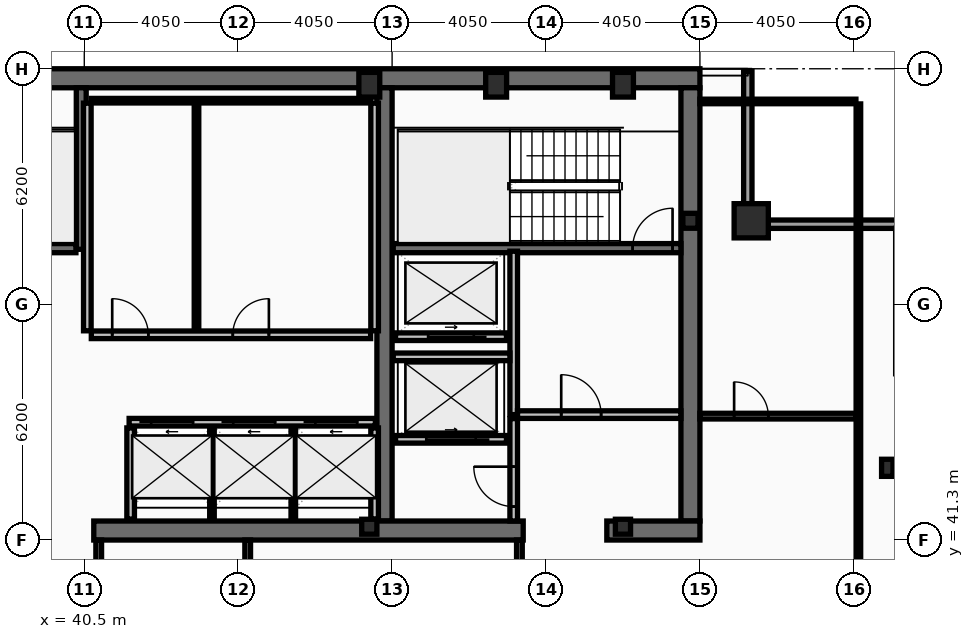
"""IFC4 building model, lengths in metres.
Left out: names, types, materials, properties, quantities, classifications, styles, units other than length and angle.
Written with IfcOpenShell. Run it as: python <this file> out.ifc"""

import sys

from ifc_helpers import new_model, si_unit, direction, frame, frame_2d, origin, origin_2d, place, context, subcontext, project, spatial, rectangle, hollow_rectangle, i_section, extrude, element, fill, save


model = new_model("IFC4")
c1 = context("Model", 3, precision=1e-05, world=origin(), true_north=direction((0.0, 1.0)))
c2 = subcontext(c1, "Body", "Model", "MODEL_VIEW")
j1 = project(units=[si_unit("LENGTHUNIT", "METRE"), si_unit("PLANEANGLEUNIT", "RADIAN")], contexts=[c1])
p1 = place(None, origin())
s1 = spatial("IfcSite", under=j1, at=p1, CompositionType="ELEMENT")
p2 = place(p1, origin())
s2 = spatial("IfcBuilding", under=s1, at=p2, CompositionType="ELEMENT")
p3 = place(p2, frame((0.0, 0.0, 339.8)))
s3 = spatial("IfcBuildingStorey", under=s2, at=p3, CompositionType="ELEMENT", Elevation=339.8)
p4 = place(p3, frame((16.2, 53.45, 0.0), z_axis=(0.0, 0.0, 1.0), x_axis=(1.0, 0.0, 0.0)))
e1 = element("IfcWall", 1, at=p4, inside=s3, PredefinedType="SHEAR", context=c2, shape_type="SweptSolid", body=[
    extrude(rectangle(XDim=40.5, YDim=0.5, at=frame_2d((20.25, 0.0))), origin(), (0.0, 0.0, 1.0), 3.44),
])
p5 = place(p3, frame((56.45, 53.2, 0.0), z_axis=(0.0, 0.0, 1.0), x_axis=(0.0, -1.0, 0.0)))
e2 = element("IfcWall", 2, at=p5, inside=s3, PredefinedType="SHEAR", context=c2, shape_type="SweptSolid", body=[
    extrude(rectangle(XDim=11.4, YDim=0.5, at=frame_2d((5.7, 0.0))), origin(), (0.0, 0.0, 1.0), 3.44),
])
p6 = place(p3, frame((48.4, 41.8, 0.0), z_axis=(0.0, 0.0, 1.0), x_axis=(0.0, 1.0, 0.0)))
e3 = element("IfcWall", 3, at=p6, inside=s3, PredefinedType="SHEAR", context=c2, shape_type="SweptSolid", body=[
    extrude(rectangle(XDim=11.4, YDim=0.4, at=frame_2d((5.7, 0.0))), origin(), (0.0, 0.0, 1.0), 3.44),
])
p7 = place(p3, frame((52.05, 41.55, 0.0), z_axis=(0.0, 0.0, 1.0), x_axis=(-1.0, 0.0, 0.0)))
e4 = element("IfcWall", 4, at=p7, inside=s3, PredefinedType="SHEAR", context=c2, shape_type="SweptSolid", body=[
    extrude(rectangle(XDim=11.3, YDim=0.5, at=frame_2d((5.65, 0.0))), origin(), (0.0, 0.0, 1.0), 3.44),
])
p8 = place(p3, frame((56.7, 41.55, 0.0), z_axis=(0.0, 0.0, 1.0), x_axis=(-1.0, 0.0, 0.0)))
e5 = element("IfcWall", 5, at=p8, inside=s3, PredefinedType="SHEAR", context=c2, shape_type="SweptSolid", body=[
    extrude(rectangle(XDim=2.45, YDim=0.5, at=frame_2d((1.225, 0.0))), origin(), (0.0, 0.0, 1.0), 3.44),
])
p9 = place(p3, frame((40.42, 48.95, 0.0), z_axis=(0.0, 0.0, 1.0), x_axis=(0.0, 1.0, 0.0)))
e6 = element("IfcWall", 6, at=p9, inside=s3, PredefinedType="SHEAR", context=c2, shape_type="SweptSolid", body=[
    extrude(rectangle(XDim=4.25, YDim=0.26, at=frame_2d((2.125, 0.0))), origin(), (0.0, 0.0, 1.0), 3.44),
])
p10 = place(p3, frame((48.63, 48.98, 0.0), z_axis=(0.0, 0.0, 1.0), x_axis=(1.0, 0.0, 0.0)))
e7 = element("IfcWall", 7, at=p10, inside=s3, PredefinedType="SHEAR", context=c2, shape_type="SweptSolid", body=[
    extrude(rectangle(XDim=7.57, YDim=0.24, at=frame_2d((3.785, 0.0))), origin(), (0.0, 0.0, 1.0), 3.44),
])
p11 = place(p10, frame((6.3, 0.0, 0.0)))
e8 = element("IfcOpeningElement", 8, at=p11, cuts=e7, PredefinedType="OPENING", context=c2, shape_type="SweptSolid", body=[
    extrude(rectangle(XDim=1.05, YDim=2.15, at=frame_2d((0.525, 1.075))), frame((0.0, 0.13, 0.0), z_axis=(0.0, -1.0, 0.0), x_axis=(1.0, 0.0, 0.0)), (0.0, 0.0, 1.0), 0.26),
])
p12 = place(p3, frame((32.72, 48.98, 0.0), z_axis=(0.0, 0.0, 1.0), x_axis=(1.0, 0.0, 0.0)))
e9 = element("IfcWall", 9, at=p12, inside=s3, PredefinedType="SHEAR", context=c2, shape_type="SweptSolid", body=[
    extrude(rectangle(XDim=7.56, YDim=0.24, at=frame_2d((3.78, 0.0))), origin(), (0.0, 0.0, 1.0), 3.44),
])
p13 = place(p12, frame((0.22, 0.0, 0.0)))
e10 = element("IfcOpeningElement", 10, at=p13, cuts=e9, PredefinedType="OPENING", context=c2, shape_type="SweptSolid", body=[
    extrude(rectangle(XDim=1.05, YDim=2.15, at=frame_2d((0.525, 1.075))), frame((0.0, 0.13, 0.0), z_axis=(0.0, -1.0, 0.0), x_axis=(1.0, 0.0, 0.0)), (0.0, 0.0, 1.0), 0.26),
])
p14 = place(p3, frame((58.05, 49.7, 0.0), z_axis=(0.0, 0.0, 1.0), x_axis=(1.0, 0.0, 0.0)))
e11 = element("IfcColumn", 11, at=p14, inside=s3, PredefinedType="COLUMN", context=c2, shape_type="SweptSolid", body=[
    extrude(hollow_rectangle(XDim=0.9, YDim=0.9, WallThickness=0.05, at=origin_2d()), origin(), (0.0, 0.0, 1.0), 3.6),
])
for number, where, z_axis, x_axis in (
    (12, (48.0, 53.28, 0.0), (0.0, 0.0, 1.0), (1.0, 0.0, 0.0)),
    (13, (51.337, 53.28, 0.0), (0.0, 0.0, 1.0), (1.0, 0.0, 0.0)),
    (14, (54.675, 53.28, 0.0), (0.0, 0.0, 1.0), (1.0, 0.0, 0.0)),
):
    element("IfcColumn", number, at=place(p3, frame(where, z_axis=z_axis, x_axis=x_axis)), inside=s3, PredefinedType="COLUMN", context=c2, shape_type="SweptSolid", body=[
        extrude(hollow_rectangle(XDim=0.55, YDim=0.65, WallThickness=0.04, at=origin_2d()), origin(), (0.0, 0.0, 1.0), 3.6),
    ])
p15 = place(p3, frame((61.63, 43.2, 0.0), z_axis=(0.0, 0.0, 1.0), x_axis=(1.0, 0.0, 0.0)))
e15 = element("IfcColumn", 15, at=p15, inside=s3, PredefinedType="COLUMN", context=c2, shape_type="SweptSolid", body=[
    extrude(i_section(OverallWidth=0.3, OverallDepth=0.45, WebThickness=0.014, FlangeThickness=0.026, at=origin_2d()), origin(), (0.0, 0.0, 1.0), 3.6),
])
for number, where, z_axis, x_axis in (
    (16, (56.45, 49.7, 0.0), (0.0, 0.0, 1.0), (1.0, 0.0, 0.0)),
    (17, (48.0, 41.65, 0.0), (0.0, 0.0, 1.0), (1.0, 0.0, 0.0)),
    (18, (54.675, 41.65, 0.0), (0.0, 0.0, 1.0), (1.0, 0.0, 0.0)),
):
    element("IfcColumn", number, at=place(p3, frame(where, z_axis=z_axis, x_axis=x_axis)), inside=s3, PredefinedType="COLUMN", context=c2, shape_type="SweptSolid", body=[
        extrude(i_section(OverallWidth=0.399, OverallDepth=0.393, WebThickness=0.023, FlangeThickness=0.037, at=origin_2d()), origin(), (0.0, 0.0, 1.0), 3.6),
    ])
p16 = place(p3, frame((57.96, 53.63, 0.0), z_axis=(0.0, 0.0, 1.0), x_axis=(0.0, -1.0, 0.0)))
e19 = element("IfcWall", 19, at=p16, inside=s3, PredefinedType="SOLIDWALL", context=c2, shape_type="SweptSolid", body=[
    extrude(rectangle(XDim=3.91, YDim=0.22, at=frame_2d((1.955, 0.0))), origin(), (0.0, 0.0, 1.0), 2.88),
])
p17 = place(p3, frame((57.85, 49.61, 0.0), z_axis=(0.0, 0.0, 1.0), x_axis=(1.0, 0.0, 0.0)))
e20 = element("IfcWall", 20, at=p17, inside=s3, PredefinedType="SOLIDWALL", context=c2, shape_type="SweptSolid", body=[
    extrude(rectangle(XDim=4.22, YDim=0.22, at=frame_2d((2.11, 0.0))), origin(), (0.0, 0.0, 1.0), 2.88),
])
p18 = place(p3, frame((41.68, 44.4, 0.0), z_axis=(0.0, 0.0, 1.0), x_axis=(1.0, 0.0, 0.0)))
e21 = element("IfcWall", 21, at=p18, inside=s3, PredefinedType="PARTITIONING", context=c2, shape_type="SweptSolid", body=[
    extrude(rectangle(XDim=6.48, YDim=0.2, at=frame_2d((3.24, 0.0))), origin(), (0.0, 0.0, 1.0), 3.44),
])
p19 = place(p18, frame((0.58, 0.0, 0.0)))
e22 = element("IfcOpeningElement", 22, at=p19, cuts=e21, PredefinedType="OPENING", context=c2, shape_type="SweptSolid", body=[
    extrude(rectangle(XDim=1.1, YDim=2.18, at=frame_2d((0.55, 1.09))), frame((0.0, 0.11, 0.0), z_axis=(0.0, -1.0, 0.0), x_axis=(1.0, 0.0, 0.0)), (0.0, 0.0, 1.0), 0.22),
])
p20 = place(p18, frame((2.74, 0.0, 0.0)))
e23 = element("IfcOpeningElement", 23, at=p20, cuts=e21, PredefinedType="OPENING", context=c2, shape_type="SweptSolid", body=[
    extrude(rectangle(XDim=1.1, YDim=2.18, at=frame_2d((0.55, 1.09))), frame((0.0, 0.11, 0.0), z_axis=(0.0, -1.0, 0.0), x_axis=(1.0, 0.0, 0.0)), (0.0, 0.0, 1.0), 0.22),
])
p21 = place(p18, frame((4.9, 0.0, 0.0)))
e24 = element("IfcOpeningElement", 24, at=p21, cuts=e21, PredefinedType="OPENING", context=c2, shape_type="SweptSolid", body=[
    extrude(rectangle(XDim=1.1, YDim=2.18, at=frame_2d((0.55, 1.09))), frame((0.0, 0.11, 0.0), z_axis=(0.0, -1.0, 0.0), x_axis=(1.0, 0.0, 0.0)), (0.0, 0.0, 1.0), 0.22),
])
p22 = place(p3, frame((51.61, 43.95, 0.0), z_axis=(0.0, 0.0, 1.0), x_axis=(-1.0, 0.0, 0.0)))
e25 = element("IfcWall", 25, at=p22, inside=s3, PredefinedType="PARTITIONING", context=c2, shape_type="SweptSolid", body=[
    extrude(rectangle(XDim=2.92, YDim=0.2, at=frame_2d((1.46, 0.0))), origin(), (0.0, 0.0, 1.0), 3.44),
])
p23 = place(p22, frame((0.81, 0.0, 0.0)))
e26 = element("IfcOpeningElement", 26, at=p23, cuts=e25, PredefinedType="OPENING", context=c2, shape_type="SweptSolid", body=[
    extrude(rectangle(XDim=1.3, YDim=2.18, at=frame_2d((0.65, 1.09))), frame((0.0, 0.11, 0.0), z_axis=(0.0, -1.0, 0.0), x_axis=(1.0, 0.0, 0.0)), (0.0, 0.0, 1.0), 0.22),
])
p24 = place(p3, frame((51.61, 46.65, 0.0), z_axis=(0.0, 0.0, 1.0), x_axis=(-1.0, 0.0, 0.0)))
e27 = element("IfcWall", 27, at=p24, inside=s3, PredefinedType="PARTITIONING", context=c2, shape_type="SweptSolid", body=[
    extrude(rectangle(XDim=2.92, YDim=0.2, at=frame_2d((1.46, 0.0))), origin(), (0.0, 0.0, 1.0), 3.44),
])
p25 = place(p24, frame((0.86, 0.0, 0.0)))
e28 = element("IfcOpeningElement", 28, at=p25, cuts=e27, PredefinedType="OPENING", context=c2, shape_type="SweptSolid", body=[
    extrude(rectangle(XDim=1.2, YDim=2.18, at=frame_2d((0.6, 1.09))), frame((0.0, 0.11, 0.0), z_axis=(0.0, -1.0, 0.0), x_axis=(1.0, 0.0, 0.0)), (0.0, 0.0, 1.0), 0.22),
])
p26 = place(p3, frame((51.8, 44.6, 0.0), z_axis=(0.0, 0.0, 1.0), x_axis=(0.0, 1.0, 0.0)))
e29 = element("IfcWall", 29, at=p26, inside=s3, PredefinedType="PARTITIONING", context=c2, shape_type="SweptSolid", body=[
    extrude(rectangle(XDim=4.3, YDim=0.2, at=frame_2d((2.15, 0.0))), origin(), (0.0, 0.0, 1.0), 3.44),
])
p27 = place(p3, frame((51.9, 44.6, 0.0), z_axis=(0.0, 0.0, 1.0), x_axis=(1.0, 0.0, 0.0)))
e30 = element("IfcWall", 30, at=p27, inside=s3, PredefinedType="PARTITIONING", context=c2, shape_type="SweptSolid", body=[
    extrude(rectangle(XDim=4.3, YDim=0.2, at=frame_2d((2.15, 0.0))), origin(), (0.0, 0.0, 1.0), 3.44),
])
p28 = place(p27, frame((1.15, 0.0, 0.0)))
e31 = element("IfcOpeningElement", 31, at=p28, cuts=e30, PredefinedType="OPENING", context=c2, shape_type="SweptSolid", body=[
    extrude(rectangle(XDim=1.05, YDim=2.15, at=frame_2d((0.525, 1.075))), frame((0.0, 0.11, 0.0), z_axis=(0.0, -1.0, 0.0), x_axis=(1.0, 0.0, 0.0)), (0.0, 0.0, 1.0), 0.22),
])
p29 = place(p3, frame((48.63, 46.12, 0.0), z_axis=(0.0, 0.0, 1.0), x_axis=(1.0, 0.0, 0.0)))
e32 = element("IfcWall", 32, at=p29, inside=s3, PredefinedType="PARTITIONING", context=c2, shape_type="SweptSolid", body=[
    extrude(rectangle(XDim=3.07, YDim=0.2, at=frame_2d((1.535, 0.0))), origin(), (0.0, 0.0, 1.0), 3.44),
])
p30 = place(p3, frame((51.8, 41.8, 0.0), z_axis=(0.0, 0.0, 1.0), x_axis=(0.0, 1.0, 0.0)))
e33 = element("IfcWall", 33, at=p30, inside=s3, PredefinedType="PARTITIONING", context=c2, shape_type="SweptSolid", body=[
    extrude(rectangle(XDim=2.695, YDim=0.2, at=frame_2d((1.348, 0.0))), origin(), (0.0, 0.0, 1.0), 3.44),
])
p31 = place(p30, frame((0.38, 0.0, 0.0)))
e34 = element("IfcOpeningElement", 34, at=p31, cuts=e33, PredefinedType="OPENING", context=c2, shape_type="SweptSolid", body=[
    extrude(rectangle(XDim=1.05, YDim=2.15, at=frame_2d((0.525, 1.075))), frame((0.0, 0.11, 0.0), z_axis=(0.0, -1.0, 0.0), x_axis=(1.0, 0.0, 0.0)), (0.0, 0.0, 1.0), 0.22),
])
for number, where, z_axis, x_axis in (
    (35, (40.58, 46.805, 0.0), (0.0, 0.0, 1.0), (0.0, 1.0, 0.0)),
    (36, (48.14, 46.805, 0.0), (0.0, 0.0, 1.0), (0.0, 1.0, 0.0)),
):
    element("IfcWall", number, at=place(p3, frame(where, z_axis=z_axis, x_axis=x_axis)), inside=s3, PredefinedType="PARTITIONING", context=c2, shape_type="SweptSolid", body=[
        extrude(rectangle(XDim=5.99, YDim=0.2, at=frame_2d((2.995, 0.0))), origin(), (0.0, 0.0, 1.0), 3.44),
    ])
p32 = place(p3, frame((40.685, 52.86, 0.0), z_axis=(0.0, 0.0, 1.0), x_axis=(1.0, 0.0, 0.0)))
e37 = element("IfcWall", 37, at=p32, inside=s3, PredefinedType="PARTITIONING", context=c2, shape_type="SweptSolid", body=[
    extrude(rectangle(XDim=7.35, YDim=0.12, at=frame_2d((3.675, 0.0))), origin(), (0.0, 0.0, 1.0), 3.44),
])
p33 = place(p3, frame((43.453, 46.805, 0.0), z_axis=(0.0, 0.0, 1.0), x_axis=(0.0, 1.0, 0.0)))
e38 = element("IfcWall", 38, at=p33, inside=s3, PredefinedType="PARTITIONING", context=c2, shape_type="SweptSolid", body=[
    extrude(rectangle(XDim=5.99, YDim=0.12, at=frame_2d((2.995, 0.0))), origin(), (0.0, 0.0, 1.0), 3.44),
])
p34 = place(p3, frame((40.685, 46.7, 0.0), z_axis=(0.0, 0.0, 1.0), x_axis=(1.0, 0.0, 0.0)))
e39 = element("IfcWall", 39, at=p34, inside=s3, PredefinedType="PARTITIONING", context=c2, shape_type="SweptSolid", body=[
    extrude(rectangle(XDim=7.35, YDim=0.2, at=frame_2d((3.675, 0.0))), origin(), (0.0, 0.0, 1.0), 3.44),
])
p35 = place(p34, frame((0.55, 0.0, 0.0)))
e40 = element("IfcOpeningElement", 40, at=p35, cuts=e39, PredefinedType="OPENING", context=c2, shape_type="SweptSolid", body=[
    extrude(rectangle(XDim=0.95, YDim=2.1, at=frame_2d((0.475, 1.05))), frame((0.0, 0.11, 0.0), z_axis=(0.0, -1.0, 0.0), x_axis=(1.0, 0.0, 0.0)), (0.0, 0.0, 1.0), 0.22),
])
p36 = place(p34, frame((3.723, 0.0, 0.0)))
e41 = element("IfcOpeningElement", 41, at=p36, cuts=e39, PredefinedType="OPENING", context=c2, shape_type="SweptSolid", body=[
    extrude(rectangle(XDim=0.95, YDim=2.1, at=frame_2d((0.475, 1.05))), frame((0.0, 0.11, 0.0), z_axis=(0.0, -1.0, 0.0), x_axis=(1.0, 0.0, 0.0)), (0.0, 0.0, 1.0), 0.22),
])
for number, where, z_axis, x_axis in (
    (42, (41.72, 41.85, 0.0), (0.0, 0.0, 1.0), (0.0, 1.0, 0.0)),
    (43, (48.14, 41.85, 0.0), (0.0, 0.0, 1.0), (0.0, 1.0, 0.0)),
):
    element("IfcWall", number, at=place(p3, frame(where, z_axis=z_axis, x_axis=x_axis)), inside=s3, PredefinedType="PARTITIONING", context=c2, shape_type="SweptSolid", body=[
        extrude(rectangle(XDim=2.4, YDim=0.2, at=frame_2d((1.2, 0.0))), origin(), (0.0, 0.0, 1.0), 3.44),
    ])
for number, where, z_axis, x_axis in (
    (44, (43.86, 41.85, 0.0), (0.0, 0.0, 1.0), (0.0, 1.0, 0.0)),
    (45, (46.0, 41.85, 0.0), (0.0, 0.0, 1.0), (0.0, 1.0, 0.0)),
):
    element("IfcWall", number, at=place(p3, frame(where, z_axis=z_axis, x_axis=x_axis)), inside=s3, PredefinedType="PARTITIONING", context=c2, shape_type="SweptSolid", body=[
        extrude(rectangle(XDim=2.4, YDim=0.12, at=frame_2d((1.2, 0.0))), origin(), (0.0, 0.0, 1.0), 3.44),
    ])
for number, where, z_axis, x_axis in (
    (46, (40.88, 38.28, 0.0), (0.0, 0.0, 1.0), (0.0, 1.0, 0.0)),
    (47, (44.8, 38.28, 0.0), (0.0, 0.0, 1.0), (0.0, 1.0, 0.0)),
    (48, (51.95, 38.28, 0.0), (0.0, 0.0, 1.0), (0.0, 1.0, 0.0)),
):
    element("IfcWall", number, at=place(p3, frame(where, z_axis=z_axis, x_axis=x_axis)), inside=s3, PredefinedType="PARTITIONING", context=c2, shape_type="SweptSolid", body=[
        extrude(rectangle(XDim=3.02, YDim=0.15, at=frame_2d((1.51, 0.0))), origin(), (0.0, 0.0, 1.0), 3.44),
    ])
p37 = place(p3, frame((56.7, 44.56, 0.0), z_axis=(0.0, 0.0, 1.0), x_axis=(1.0, 0.0, 0.0)))
e49 = element("IfcWall", 49, at=p37, inside=s3, PredefinedType="PARTITIONING", context=c2, shape_type="SweptSolid", body=[
    extrude(rectangle(XDim=4.105, YDim=0.15, at=frame_2d((2.052, 0.0))), origin(), (0.0, 0.0, 1.0), 2.88),
])
p38 = place(p37, frame((0.9, 0.0, 0.0)))
e50 = element("IfcOpeningElement", 50, at=p38, cuts=e49, PredefinedType="OPENING", context=c2, shape_type="SweptSolid", body=[
    extrude(rectangle(XDim=0.9, YDim=2.05, at=frame_2d((0.45, 1.025))), frame((0.0, 0.085, 0.0), z_axis=(0.0, -1.0, 0.0), x_axis=(1.0, 0.0, 0.0)), (0.0, 0.0, 1.0), 0.17),
])
p39 = place(p3, frame((60.87, 10.665, 0.0), z_axis=(0.0, 0.0, 1.0), x_axis=(0.0, 1.0, 0.0)))
e51 = element("IfcWall", 51, at=p39, inside=s3, PredefinedType="PARTITIONING", context=c2, shape_type="SweptSolid", body=[
    extrude(rectangle(XDim=42.11, YDim=0.12, at=frame_2d((21.055, 0.0))), origin(), (0.0, 0.0, 1.0), 2.83),
])
p40 = place(p3, frame((56.7, 52.84, 0.0), z_axis=(0.0, 0.0, 1.0), x_axis=(1.0, 0.0, 0.0)))
e52 = element("IfcWall", 52, at=p40, inside=s3, PredefinedType="PARTITIONING", context=c2, shape_type="SweptSolid", body=[
    extrude(rectangle(XDim=4.105, YDim=0.12, at=frame_2d((2.052, 0.0))), origin(), (0.0, 0.0, 1.0), 3.44),
])
p41 = place(p11, origin())
e53 = element("IfcDoor", 53, at=p41, inside=s3, OperationType="SINGLE_SWING_RIGHT", PredefinedType="DOOR", context=c2, shape_type="SweptSolid", body=[
    extrude(rectangle(XDim=1.05, YDim=2.15, at=frame_2d((0.525, 1.075))), frame((0.0, 0.025, 0.0), z_axis=(0.0, -1.0, 0.0), x_axis=(1.0, 0.0, 0.0)), (0.0, 0.0, 1.0), 0.05),
])
fill(e8, e53)
p42 = place(p19, origin())
e54 = element("IfcDoor", 54, at=p42, inside=s3, OperationType="SLIDING_TO_LEFT", PredefinedType="DOOR", context=c2, shape_type="SweptSolid", body=[
    extrude(rectangle(XDim=1.1, YDim=2.18, at=frame_2d((0.55, 1.09))), frame((0.0, 0.025, 0.0), z_axis=(0.0, -1.0, 0.0), x_axis=(1.0, 0.0, 0.0)), (0.0, 0.0, 1.0), 0.05),
])
fill(e22, e54)
p43 = place(p20, origin())
e55 = element("IfcDoor", 55, at=p43, inside=s3, OperationType="SLIDING_TO_LEFT", PredefinedType="DOOR", context=c2, shape_type="SweptSolid", body=[
    extrude(rectangle(XDim=1.1, YDim=2.18, at=frame_2d((0.55, 1.09))), frame((0.0, 0.025, 0.0), z_axis=(0.0, -1.0, 0.0), x_axis=(1.0, 0.0, 0.0)), (0.0, 0.0, 1.0), 0.05),
])
fill(e23, e55)
p44 = place(p21, origin())
e56 = element("IfcDoor", 56, at=p44, inside=s3, OperationType="SLIDING_TO_LEFT", PredefinedType="DOOR", context=c2, shape_type="SweptSolid", body=[
    extrude(rectangle(XDim=1.1, YDim=2.18, at=frame_2d((0.55, 1.09))), frame((0.0, 0.025, 0.0), z_axis=(0.0, -1.0, 0.0), x_axis=(1.0, 0.0, 0.0)), (0.0, 0.0, 1.0), 0.05),
])
fill(e24, e56)
p45 = place(p23, origin())
e57 = element("IfcDoor", 57, at=p45, inside=s3, OperationType="SLIDING_TO_LEFT", PredefinedType="DOOR", context=c2, shape_type="SweptSolid", body=[
    extrude(rectangle(XDim=1.3, YDim=2.18, at=frame_2d((0.65, 1.09))), frame((0.0, 0.025, 0.0), z_axis=(0.0, -1.0, 0.0), x_axis=(1.0, 0.0, 0.0)), (0.0, 0.0, 1.0), 0.05),
])
fill(e26, e57)
p46 = place(p25, origin())
e58 = element("IfcDoor", 58, at=p46, inside=s3, OperationType="SLIDING_TO_LEFT", PredefinedType="DOOR", context=c2, shape_type="SweptSolid", body=[
    extrude(rectangle(XDim=1.2, YDim=2.18, at=frame_2d((0.6, 1.09))), frame((0.0, 0.025, 0.0), z_axis=(0.0, -1.0, 0.0), x_axis=(1.0, 0.0, 0.0)), (0.0, 0.0, 1.0), 0.05),
])
fill(e28, e58)
p47 = place(p28, origin())
e59 = element("IfcDoor", 59, at=p47, inside=s3, OperationType="SINGLE_SWING_LEFT", PredefinedType="DOOR", context=c2, shape_type="SweptSolid", body=[
    extrude(rectangle(XDim=1.05, YDim=2.15, at=frame_2d((0.525, 1.075))), frame((0.0, 0.025, 0.0), z_axis=(0.0, -1.0, 0.0), x_axis=(1.0, 0.0, 0.0)), (0.0, 0.0, 1.0), 0.05),
])
fill(e31, e59)
p48 = place(p31, origin())
e60 = element("IfcDoor", 60, at=p48, inside=s3, OperationType="SINGLE_SWING_RIGHT", PredefinedType="DOOR", context=c2, shape_type="SweptSolid", body=[
    extrude(rectangle(XDim=1.05, YDim=2.15, at=frame_2d((0.525, 1.075))), frame((0.0, 0.025, 0.0), z_axis=(0.0, -1.0, 0.0), x_axis=(1.0, 0.0, 0.0)), (0.0, 0.0, 1.0), 0.05),
])
fill(e34, e60)
p49 = place(p35, origin())
e61 = element("IfcDoor", 61, at=p49, inside=s3, OperationType="SINGLE_SWING_LEFT", PredefinedType="DOOR", context=c2, shape_type="SweptSolid", body=[
    extrude(rectangle(XDim=0.95, YDim=2.1, at=frame_2d((0.475, 1.05))), frame((0.0, 0.025, 0.0), z_axis=(0.0, -1.0, 0.0), x_axis=(1.0, 0.0, 0.0)), (0.0, 0.0, 1.0), 0.05),
])
fill(e40, e61)
p50 = place(p36, origin())
e62 = element("IfcDoor", 62, at=p50, inside=s3, OperationType="SINGLE_SWING_RIGHT", PredefinedType="DOOR", context=c2, shape_type="SweptSolid", body=[
    extrude(rectangle(XDim=0.95, YDim=2.1, at=frame_2d((0.475, 1.05))), frame((0.0, 0.025, 0.0), z_axis=(0.0, -1.0, 0.0), x_axis=(1.0, 0.0, 0.0)), (0.0, 0.0, 1.0), 0.05),
])
fill(e41, e62)
p51 = place(p38, origin())
e63 = element("IfcDoor", 63, at=p51, inside=s3, OperationType="SINGLE_SWING_LEFT", PredefinedType="DOOR", context=c2, shape_type="SweptSolid", body=[
    extrude(rectangle(XDim=0.9, YDim=2.05, at=frame_2d((0.45, 1.025))), frame((0.0, 0.025, 0.0), z_axis=(0.0, -1.0, 0.0), x_axis=(1.0, 0.0, 0.0)), (0.0, 0.0, 1.0), 0.05),
])
fill(e50, e63)
save(model, sys.argv[1])
